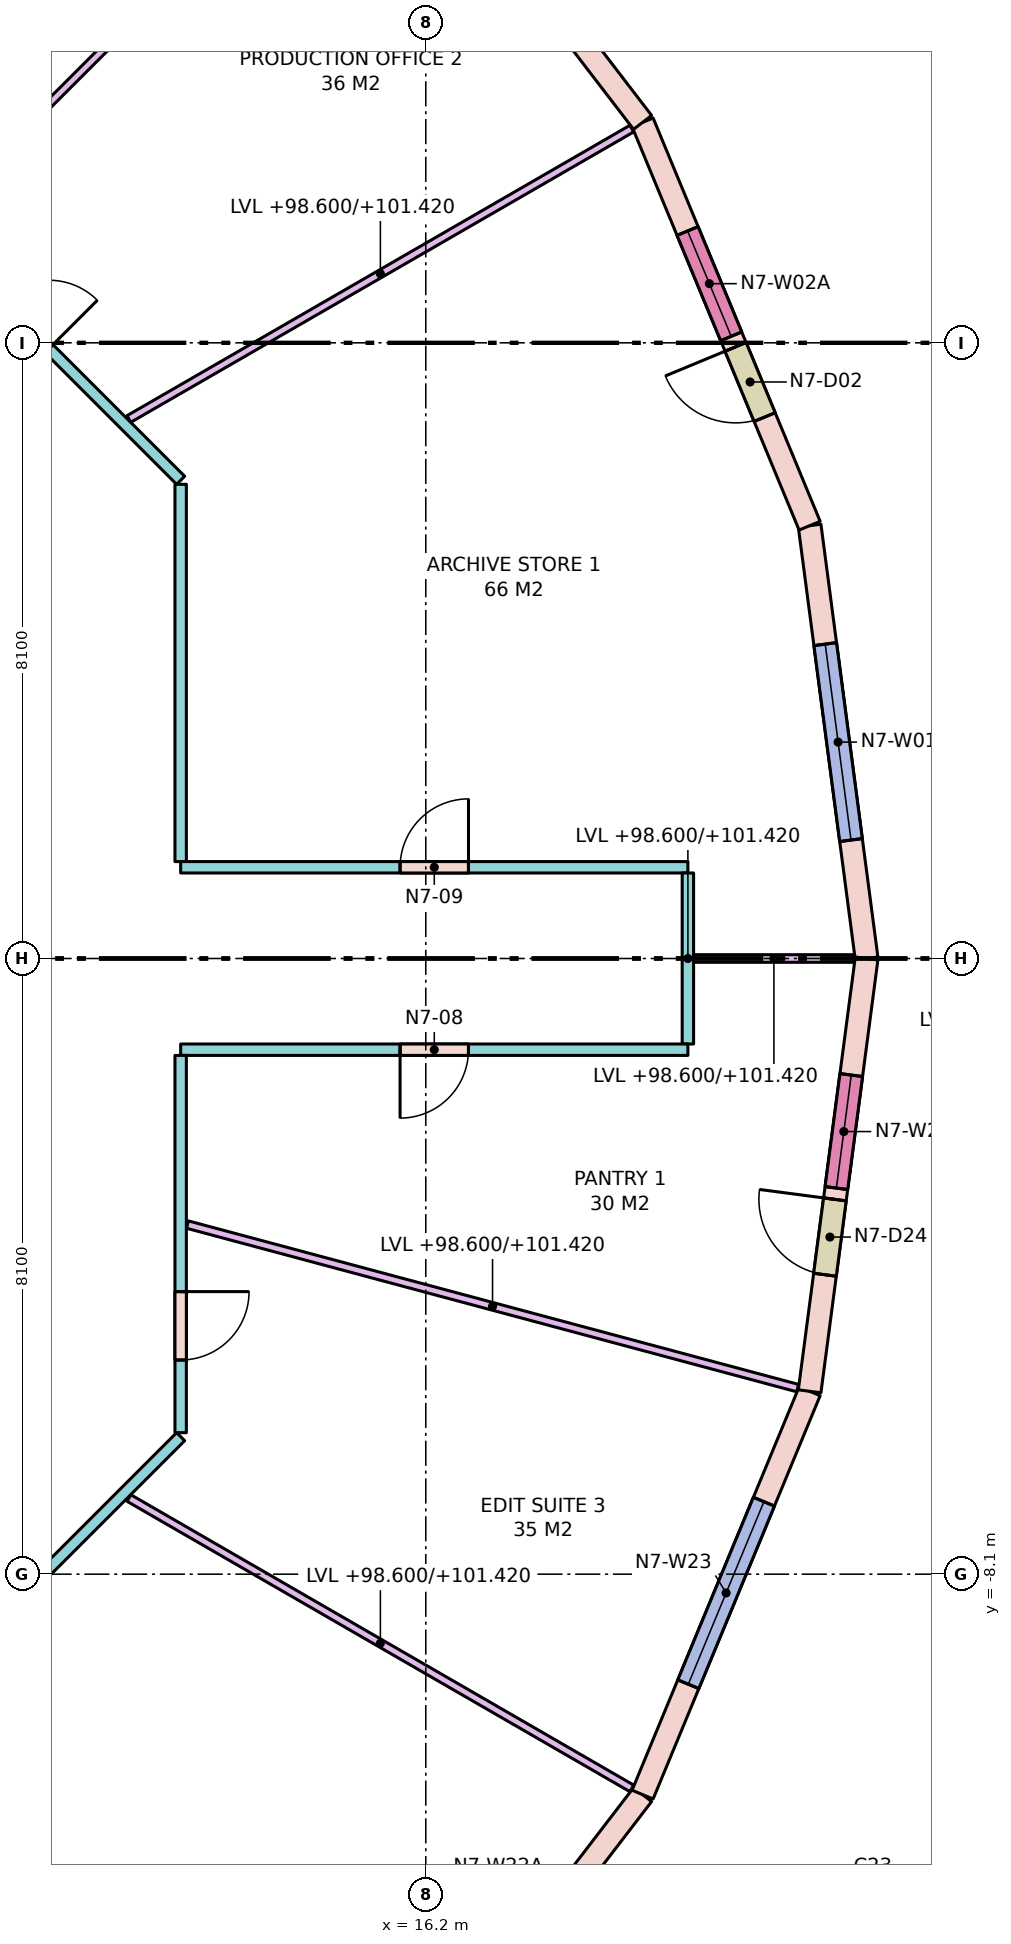
"""IFC4 building model, lengths in metres.
Left out: names, types, materials, properties, quantities, classifications, styles, units other than length and angle.
Written with IfcOpenShell. Run it as: python <this file> out.ifc"""

import sys

from ifc_helpers import new_model, si_unit, direction, frame, frame_2d, origin, place, context, subcontext, project, spatial, rectangle, extrude, element, fill, save


model = new_model("IFC4")
c1 = context("Model", 3, precision=1e-05, world=origin(), true_north=direction((0.0, 1.0)))
c2 = subcontext(c1, "Body", "Model", "MODEL_VIEW")
j1 = project(units=[si_unit("LENGTHUNIT", "METRE"), si_unit("PLANEANGLEUNIT", "RADIAN")], contexts=[c1])
p1 = place(None, origin())
s1 = spatial("IfcSite", under=j1, at=p1, CompositionType="ELEMENT")
p2 = place(p1, origin())
s2 = spatial("IfcBuilding", under=s1, at=p2, CompositionType="ELEMENT")
p3 = place(p2, frame((0.0, 0.0, 98.6)))
s3 = spatial("IfcBuildingStorey", under=s2, at=p3, CompositionType="ELEMENT", Elevation=98.6)
p4 = place(p3, frame((22.0, 0.0, 0.0), z_axis=(0.0, 0.0, 1.0), x_axis=(-0.130503995834, 0.991447783331, 0.0)))
e1 = element("IfcWall", 1, at=p4, inside=s3, PredefinedType="STANDARD", context=c2, shape_type="SweptSolid", body=[
    extrude(rectangle(XDim=5.743, YDim=0.3, at=frame_2d((2.872, 0.0))), origin(), (0.0, 0.0, 1.0), 3.72),
])
p5 = place(p4, frame((1.572, 0.0, 0.8)))
e2 = element("IfcOpeningElement", 2, at=p5, cuts=e1, PredefinedType="OPENING", context=c2, shape_type="SweptSolid", body=[
    extrude(rectangle(XDim=2.6, YDim=2.7, at=frame_2d((1.3, 1.35))), frame((0.0, 0.16, 0.0), z_axis=(0.0, -1.0, 0.0), x_axis=(1.0, 0.0, 0.0)), (0.0, 0.0, 1.0), 0.32),
])
p6 = place(p3, frame((21.25, 5.694, 0.0), z_axis=(0.0, 0.0, 1.0), x_axis=(-0.382715966503, 0.923866055759, 0.0)))
e3 = element("IfcWall", 3, at=p6, inside=s3, PredefinedType="STANDARD", context=c2, shape_type="SweptSolid", body=[
    extrude(rectangle(XDim=5.743, YDim=0.3, at=frame_2d((2.872, 0.0))), origin(), (0.0, 0.0, 1.0), 3.72),
])
p7 = place(p6, frame((1.547, 0.0, 0.0)))
e4 = element("IfcOpeningElement", 4, at=p7, cuts=e3, PredefinedType="OPENING", context=c2, shape_type="SweptSolid", body=[
    extrude(rectangle(XDim=1.0, YDim=2.4, at=frame_2d((0.5, 1.2))), frame((0.0, 0.16, 0.0), z_axis=(0.0, -1.0, 0.0), x_axis=(1.0, 0.0, 0.0)), (0.0, 0.0, 1.0), 0.32),
])
p8 = place(p6, frame((2.697, 0.0, 0.8)))
e5 = element("IfcOpeningElement", 5, at=p8, cuts=e3, PredefinedType="OPENING", context=c2, shape_type="SweptSolid", body=[
    extrude(rectangle(XDim=1.5, YDim=2.7, at=frame_2d((0.75, 1.35))), frame((0.0, 0.16, 0.0), z_axis=(0.0, -1.0, 0.0), x_axis=(1.0, 0.0, 0.0)), (0.0, 0.0, 1.0), 0.32),
])
p9 = place(p3, frame((19.052, 11.0, 0.0), z_axis=(0.0, 0.0, 1.0), x_axis=(-0.608744744291, 0.793366142647, 0.0)))
e6 = element("IfcWall", 6, at=p9, inside=s3, PredefinedType="STANDARD", context=c2, shape_type="SweptSolid", body=[
    extrude(rectangle(XDim=5.743, YDim=0.3, at=frame_2d((2.872, 0.0))), origin(), (0.0, 0.0, 1.0), 3.72),
])
p10 = place(p9, frame((1.572, 0.0, 0.8)))
e7 = element("IfcOpeningElement", 7, at=p10, cuts=e6, PredefinedType="OPENING", context=c2, shape_type="SweptSolid", body=[
    extrude(rectangle(XDim=2.6, YDim=2.7, at=frame_2d((1.3, 1.35))), frame((0.0, 0.16, 0.0), z_axis=(0.0, -1.0, 0.0), x_axis=(1.0, 0.0, 0.0)), (0.0, 0.0, 1.0), 0.32),
])
p11 = place(p3, frame((15.556, -15.556, 0.0), z_axis=(0.0, 0.0, 1.0), x_axis=(0.608744744291, 0.793366142647, 0.0)))
e8 = element("IfcWall", 8, at=p11, inside=s3, PredefinedType="STANDARD", context=c2, shape_type="SweptSolid", body=[
    extrude(rectangle(XDim=5.743, YDim=0.3, at=frame_2d((2.872, 0.0))), origin(), (0.0, 0.0, 1.0), 3.72),
])
p12 = place(p11, frame((1.547, 0.0, 0.0)))
e9 = element("IfcOpeningElement", 9, at=p12, cuts=e8, PredefinedType="OPENING", context=c2, shape_type="SweptSolid", body=[
    extrude(rectangle(XDim=1.0, YDim=2.4, at=frame_2d((0.5, 1.2))), frame((0.0, 0.16, 0.0), z_axis=(0.0, -1.0, 0.0), x_axis=(1.0, 0.0, 0.0)), (0.0, 0.0, 1.0), 0.32),
])
p13 = place(p11, frame((2.697, 0.0, 0.8)))
e10 = element("IfcOpeningElement", 10, at=p13, cuts=e8, PredefinedType="OPENING", context=c2, shape_type="SweptSolid", body=[
    extrude(rectangle(XDim=1.5, YDim=2.7, at=frame_2d((0.75, 1.35))), frame((0.0, 0.16, 0.0), z_axis=(0.0, -1.0, 0.0), x_axis=(1.0, 0.0, 0.0)), (0.0, 0.0, 1.0), 0.32),
])
p14 = place(p3, frame((19.052, -11.0, 0.0), z_axis=(0.0, 0.0, 1.0), x_axis=(0.382715966503, 0.923866055759, 0.0)))
e11 = element("IfcWall", 11, at=p14, inside=s3, PredefinedType="STANDARD", context=c2, shape_type="SweptSolid", body=[
    extrude(rectangle(XDim=5.743, YDim=0.3, at=frame_2d((2.872, 0.0))), origin(), (0.0, 0.0, 1.0), 3.72),
])
p15 = place(p14, frame((1.572, 0.0, 0.8)))
e12 = element("IfcOpeningElement", 12, at=p15, cuts=e11, PredefinedType="OPENING", context=c2, shape_type="SweptSolid", body=[
    extrude(rectangle(XDim=2.6, YDim=2.7, at=frame_2d((1.3, 1.35))), frame((0.0, 0.16, 0.0), z_axis=(0.0, -1.0, 0.0), x_axis=(1.0, 0.0, 0.0)), (0.0, 0.0, 1.0), 0.32),
])
p16 = place(p3, frame((21.25, -5.694, 0.0), z_axis=(0.0, 0.0, 1.0), x_axis=(0.130503995834, 0.991447783331, 0.0)))
e13 = element("IfcWall", 13, at=p16, inside=s3, PredefinedType="STANDARD", context=c2, shape_type="SweptSolid", body=[
    extrude(rectangle(XDim=5.743, YDim=0.3, at=frame_2d((2.872, 0.0))), origin(), (0.0, 0.0, 1.0), 3.72),
])
p17 = place(p16, frame((1.547, 0.0, 0.0)))
e14 = element("IfcOpeningElement", 14, at=p17, cuts=e13, PredefinedType="OPENING", context=c2, shape_type="SweptSolid", body=[
    extrude(rectangle(XDim=1.0, YDim=2.4, at=frame_2d((0.5, 1.2))), frame((0.0, 0.16, 0.0), z_axis=(0.0, -1.0, 0.0), x_axis=(1.0, 0.0, 0.0)), (0.0, 0.0, 1.0), 0.32),
])
p18 = place(p16, frame((2.697, 0.0, 0.8)))
e15 = element("IfcOpeningElement", 15, at=p18, cuts=e13, PredefinedType="OPENING", context=c2, shape_type="SweptSolid", body=[
    extrude(rectangle(XDim=1.5, YDim=2.7, at=frame_2d((0.75, 1.35))), frame((0.0, 0.16, 0.0), z_axis=(0.0, -1.0, 0.0), x_axis=(1.0, 0.0, 0.0)), (0.0, 0.0, 1.0), 0.32),
])
p19 = place(p3, frame((8.291, 10.975, 0.0), z_axis=(0.0, 0.0, 1.0), x_axis=(0.707106781187, -0.707106781187, 0.0)))
e16 = element("IfcWall", 16, at=p19, inside=s3, PredefinedType="PARTITIONING", context=c2, shape_type="SweptSolid", body=[
    extrude(rectangle(XDim=6.624, YDim=0.15, at=frame_2d((3.312, 0.0))), origin(), (0.0, 0.0, 1.0), 2.82),
])
p20 = place(p19, frame((3.274, 0.0, 0.0)))
e17 = element("IfcOpeningElement", 17, at=p20, cuts=e16, PredefinedType="OPENING", context=c2, shape_type="SweptSolid", body=[
    extrude(rectangle(XDim=0.9, YDim=2.1, at=frame_2d((0.45, 1.05))), frame((0.0, 0.085, 0.0), z_axis=(0.0, -1.0, 0.0), x_axis=(1.0, 0.0, 0.0)), (0.0, 0.0, 1.0), 0.17),
])
p21 = place(p19, frame((0.524, 0.0, 0.0)))
e18 = element("IfcOpeningElement", 18, at=p21, cuts=e16, PredefinedType="OPENING", context=c2, shape_type="SweptSolid", body=[
    extrude(rectangle(XDim=0.9, YDim=2.1, at=frame_2d((0.45, 1.05))), frame((0.0, 0.085, 0.0), z_axis=(0.0, -1.0, 0.0), x_axis=(1.0, 0.0, 0.0)), (0.0, 0.0, 1.0), 0.17),
])
p22 = place(p3, frame((12.975, 6.238, 0.0), z_axis=(0.0, 0.0, 1.0), x_axis=(0.0, -1.0, 0.0)))
e19 = element("IfcWall", 19, at=p22, inside=s3, PredefinedType="PARTITIONING", context=c2, shape_type="SweptSolid", body=[
    extrude(rectangle(XDim=4.963, YDim=0.15, at=frame_2d((2.482, 0.0))), origin(), (0.0, 0.0, 1.0), 2.82),
])
p23 = place(p3, frame((12.975, 1.2, 0.0), z_axis=(0.0, 0.0, 1.0), x_axis=(1.0, 0.0, 0.0)))
e20 = element("IfcWall", 20, at=p23, inside=s3, PredefinedType="PARTITIONING", context=c2, shape_type="SweptSolid", body=[
    extrude(rectangle(XDim=6.674, YDim=0.15, at=frame_2d((3.337, 0.0))), origin(), (0.0, 0.0, 1.0), 3.72),
])
p24 = place(p23, frame((2.887, 0.0, 0.0)))
e21 = element("IfcOpeningElement", 21, at=p24, cuts=e20, PredefinedType="OPENING", context=c2, shape_type="SweptSolid", body=[
    extrude(rectangle(XDim=0.9, YDim=2.1, at=frame_2d((0.45, 1.05))), frame((0.0, 0.085, 0.0), z_axis=(0.0, -1.0, 0.0), x_axis=(1.0, 0.0, 0.0)), (0.0, 0.0, 1.0), 0.17),
])
p25 = place(p3, frame((19.649, 1.125, 0.0), z_axis=(0.0, 0.0, 1.0), x_axis=(0.0, -1.0, 0.0)))
e22 = element("IfcWall", 22, at=p25, inside=s3, PredefinedType="PARTITIONING", context=c2, shape_type="SweptSolid", body=[
    extrude(rectangle(XDim=2.25, YDim=0.15, at=frame_2d((1.125, 0.0))), origin(), (0.0, 0.0, 1.0), 2.82),
])
p26 = place(p3, frame((19.649, -1.2, 0.0), z_axis=(0.0, 0.0, 1.0), x_axis=(-1.0, 0.0, 0.0)))
e23 = element("IfcWall", 23, at=p26, inside=s3, PredefinedType="PARTITIONING", context=c2, shape_type="SweptSolid", body=[
    extrude(rectangle(XDim=6.674, YDim=0.15, at=frame_2d((3.337, 0.0))), origin(), (0.0, 0.0, 1.0), 3.72),
])
p27 = place(p26, frame((2.887, 0.0, 0.0)))
e24 = element("IfcOpeningElement", 24, at=p27, cuts=e23, PredefinedType="OPENING", context=c2, shape_type="SweptSolid", body=[
    extrude(rectangle(XDim=0.9, YDim=2.1, at=frame_2d((0.45, 1.05))), frame((0.0, 0.085, 0.0), z_axis=(0.0, -1.0, 0.0), x_axis=(1.0, 0.0, 0.0)), (0.0, 0.0, 1.0), 0.17),
])
p28 = place(p3, frame((12.975, -1.275, 0.0), z_axis=(0.0, 0.0, 1.0), x_axis=(0.0, -1.0, 0.0)))
e25 = element("IfcWall", 25, at=p28, inside=s3, PredefinedType="PARTITIONING", context=c2, shape_type="SweptSolid", body=[
    extrude(rectangle(XDim=4.963, YDim=0.15, at=frame_2d((2.482, 0.0))), origin(), (0.0, 0.0, 1.0), 2.82),
])
p29 = place(p28, frame((3.107, 0.0, 0.0)))
e26 = element("IfcOpeningElement", 26, at=p29, cuts=e25, PredefinedType="OPENING", context=c2, shape_type="SweptSolid", body=[
    extrude(rectangle(XDim=0.9, YDim=2.1, at=frame_2d((0.45, 1.05))), frame((0.0, 0.085, 0.0), z_axis=(0.0, -1.0, 0.0), x_axis=(1.0, 0.0, 0.0)), (0.0, 0.0, 1.0), 0.17),
])
p30 = place(p3, frame((12.975, -6.291, 0.0), z_axis=(0.0, 0.0, 1.0), x_axis=(-0.707125355289, -0.707088206597, 0.0)))
e27 = element("IfcWall", 27, at=p30, inside=s3, PredefinedType="PARTITIONING", context=c2, shape_type="SweptSolid", body=[
    extrude(rectangle(XDim=6.572, YDim=0.15, at=frame_2d((3.286, 0.0))), origin(), (0.0, 0.0, 1.0), 2.82),
])
p31 = place(p3, frame((19.724, 0.0, 0.0), z_axis=(0.0, 0.0, 1.0), x_axis=(1.0, 0.0, 0.0)))
e28 = element("IfcWall", 28, at=p31, inside=s3, PredefinedType="PARTITIONING", context=c2, shape_type="SweptSolid", body=[
    extrude(rectangle(XDim=2.113, YDim=0.1, at=frame_2d((1.057, 0.0))), origin(), (0.0, 0.0, 1.0), 2.82),
])
p32 = place(p3, frame((12.294, 7.098, 0.0), z_axis=(0.0, 0.0, 1.0), x_axis=(0.866010520791, 0.500025777215, 0.0)))
e29 = element("IfcWall", 29, at=p32, inside=s3, PredefinedType="PARTITIONING", context=c2, shape_type="SweptSolid", body=[
    extrude(rectangle(XDim=7.641, YDim=0.1, at=frame_2d((3.82, 0.0))), origin(), (0.0, 0.0, 1.0), 2.82),
])
p33 = place(p3, frame((9.686, 9.686, 0.0), z_axis=(0.0, 0.0, 1.0), x_axis=(0.707106781187, 0.707106781187, 0.0)))
e30 = element("IfcWall", 30, at=p33, inside=s3, PredefinedType="PARTITIONING", context=c2, shape_type="SweptSolid", body=[
    extrude(rectangle(XDim=8.139, YDim=0.1, at=frame_2d((4.069, 0.0))), origin(), (0.0, 0.0, 1.0), 2.82),
])
p34 = place(p3, frame((12.294, -7.098, 0.0), z_axis=(0.0, 0.0, 1.0), x_axis=(0.866010520791, -0.500025777215, 0.0)))
e31 = element("IfcWall", 31, at=p34, inside=s3, PredefinedType="PARTITIONING", context=c2, shape_type="SweptSolid", body=[
    extrude(rectangle(XDim=7.641, YDim=0.1, at=frame_2d((3.82, 0.0))), origin(), (0.0, 0.0, 1.0), 2.82),
])
p35 = place(p3, frame((13.064, -3.5, 0.0), z_axis=(0.0, 0.0, 1.0), x_axis=(0.965920254223, -0.258839839442, 0.0)))
e32 = element("IfcWall", 32, at=p35, inside=s3, PredefinedType="PARTITIONING", context=c2, shape_type="SweptSolid", body=[
    extrude(rectangle(XDim=8.312, YDim=0.1, at=frame_2d((4.156, 0.0))), origin(), (0.0, 0.0, 1.0), 2.82),
])
p36 = place(p5, origin())
e33 = element("IfcWindow", 33, at=p36, inside=s3, PartitioningType="SINGLE_PANEL", PredefinedType="WINDOW", context=c2, shape_type="SweptSolid", body=[
    extrude(rectangle(XDim=2.6, YDim=2.7, at=frame_2d((1.3, 1.35))), frame((0.0, 0.03, 0.0), z_axis=(0.0, -1.0, 0.0), x_axis=(1.0, 0.0, 0.0)), (0.0, 0.0, 1.0), 0.06),
])
fill(e2, e33)
p37 = place(p7, origin())
e34 = element("IfcDoor", 34, at=p37, inside=s3, OperationType="SINGLE_SWING_RIGHT", PredefinedType="DOOR", context=c2, shape_type="SweptSolid", body=[
    extrude(rectangle(XDim=1.0, YDim=2.4, at=frame_2d((0.5, 1.2))), frame((0.0, 0.025, 0.0), z_axis=(0.0, -1.0, 0.0), x_axis=(1.0, 0.0, 0.0)), (0.0, 0.0, 1.0), 0.05),
])
fill(e4, e34)
p38 = place(p8, origin())
e35 = element("IfcWindow", 35, at=p38, inside=s3, PartitioningType="SINGLE_PANEL", PredefinedType="WINDOW", context=c2, shape_type="SweptSolid", body=[
    extrude(rectangle(XDim=1.5, YDim=2.7, at=frame_2d((0.75, 1.35))), frame((0.0, 0.03, 0.0), z_axis=(0.0, -1.0, 0.0), x_axis=(1.0, 0.0, 0.0)), (0.0, 0.0, 1.0), 0.06),
])
fill(e5, e35)
p39 = place(p15, origin())
e36 = element("IfcWindow", 36, at=p39, inside=s3, PartitioningType="SINGLE_PANEL", PredefinedType="WINDOW", context=c2, shape_type="SweptSolid", body=[
    extrude(rectangle(XDim=2.6, YDim=2.7, at=frame_2d((1.3, 1.35))), frame((0.0, 0.03, 0.0), z_axis=(0.0, -1.0, 0.0), x_axis=(1.0, 0.0, 0.0)), (0.0, 0.0, 1.0), 0.06),
])
fill(e12, e36)
p40 = place(p17, origin())
e37 = element("IfcDoor", 37, at=p40, inside=s3, OperationType="SINGLE_SWING_RIGHT", PredefinedType="DOOR", context=c2, shape_type="SweptSolid", body=[
    extrude(rectangle(XDim=1.0, YDim=2.4, at=frame_2d((0.5, 1.2))), frame((0.0, 0.025, 0.0), z_axis=(0.0, -1.0, 0.0), x_axis=(1.0, 0.0, 0.0)), (0.0, 0.0, 1.0), 0.05),
])
fill(e14, e37)
p41 = place(p18, origin())
e38 = element("IfcWindow", 38, at=p41, inside=s3, PartitioningType="SINGLE_PANEL", PredefinedType="WINDOW", context=c2, shape_type="SweptSolid", body=[
    extrude(rectangle(XDim=1.5, YDim=2.7, at=frame_2d((0.75, 1.35))), frame((0.0, 0.03, 0.0), z_axis=(0.0, -1.0, 0.0), x_axis=(1.0, 0.0, 0.0)), (0.0, 0.0, 1.0), 0.06),
])
fill(e15, e38)
p42 = place(p29, origin())
e39 = element("IfcDoor", 39, at=p42, inside=s3, OperationType="SINGLE_SWING_LEFT", PredefinedType="DOOR", context=c2, shape_type="SweptSolid", body=[
    extrude(rectangle(XDim=0.9, YDim=2.1, at=frame_2d((0.45, 1.05))), frame((0.0, 0.025, 0.0), z_axis=(0.0, -1.0, 0.0), x_axis=(1.0, 0.0, 0.0)), (0.0, 0.0, 1.0), 0.05),
])
fill(e26, e39)
p43 = place(p27, origin())
e40 = element("IfcDoor", 40, at=p43, inside=s3, OperationType="SINGLE_SWING_RIGHT", PredefinedType="DOOR", context=c2, shape_type="SweptSolid", body=[
    extrude(rectangle(XDim=0.9, YDim=2.1, at=frame_2d((0.45, 1.05))), frame((0.0, 0.025, 0.0), z_axis=(0.0, -1.0, 0.0), x_axis=(1.0, 0.0, 0.0)), (0.0, 0.0, 1.0), 0.05),
])
fill(e24, e40)
p44 = place(p24, origin())
e41 = element("IfcDoor", 41, at=p44, inside=s3, OperationType="SINGLE_SWING_RIGHT", PredefinedType="DOOR", context=c2, shape_type="SweptSolid", body=[
    extrude(rectangle(XDim=0.9, YDim=2.1, at=frame_2d((0.45, 1.05))), frame((0.0, 0.025, 0.0), z_axis=(0.0, -1.0, 0.0), x_axis=(1.0, 0.0, 0.0)), (0.0, 0.0, 1.0), 0.05),
])
fill(e21, e41)
save(model, sys.argv[1])
